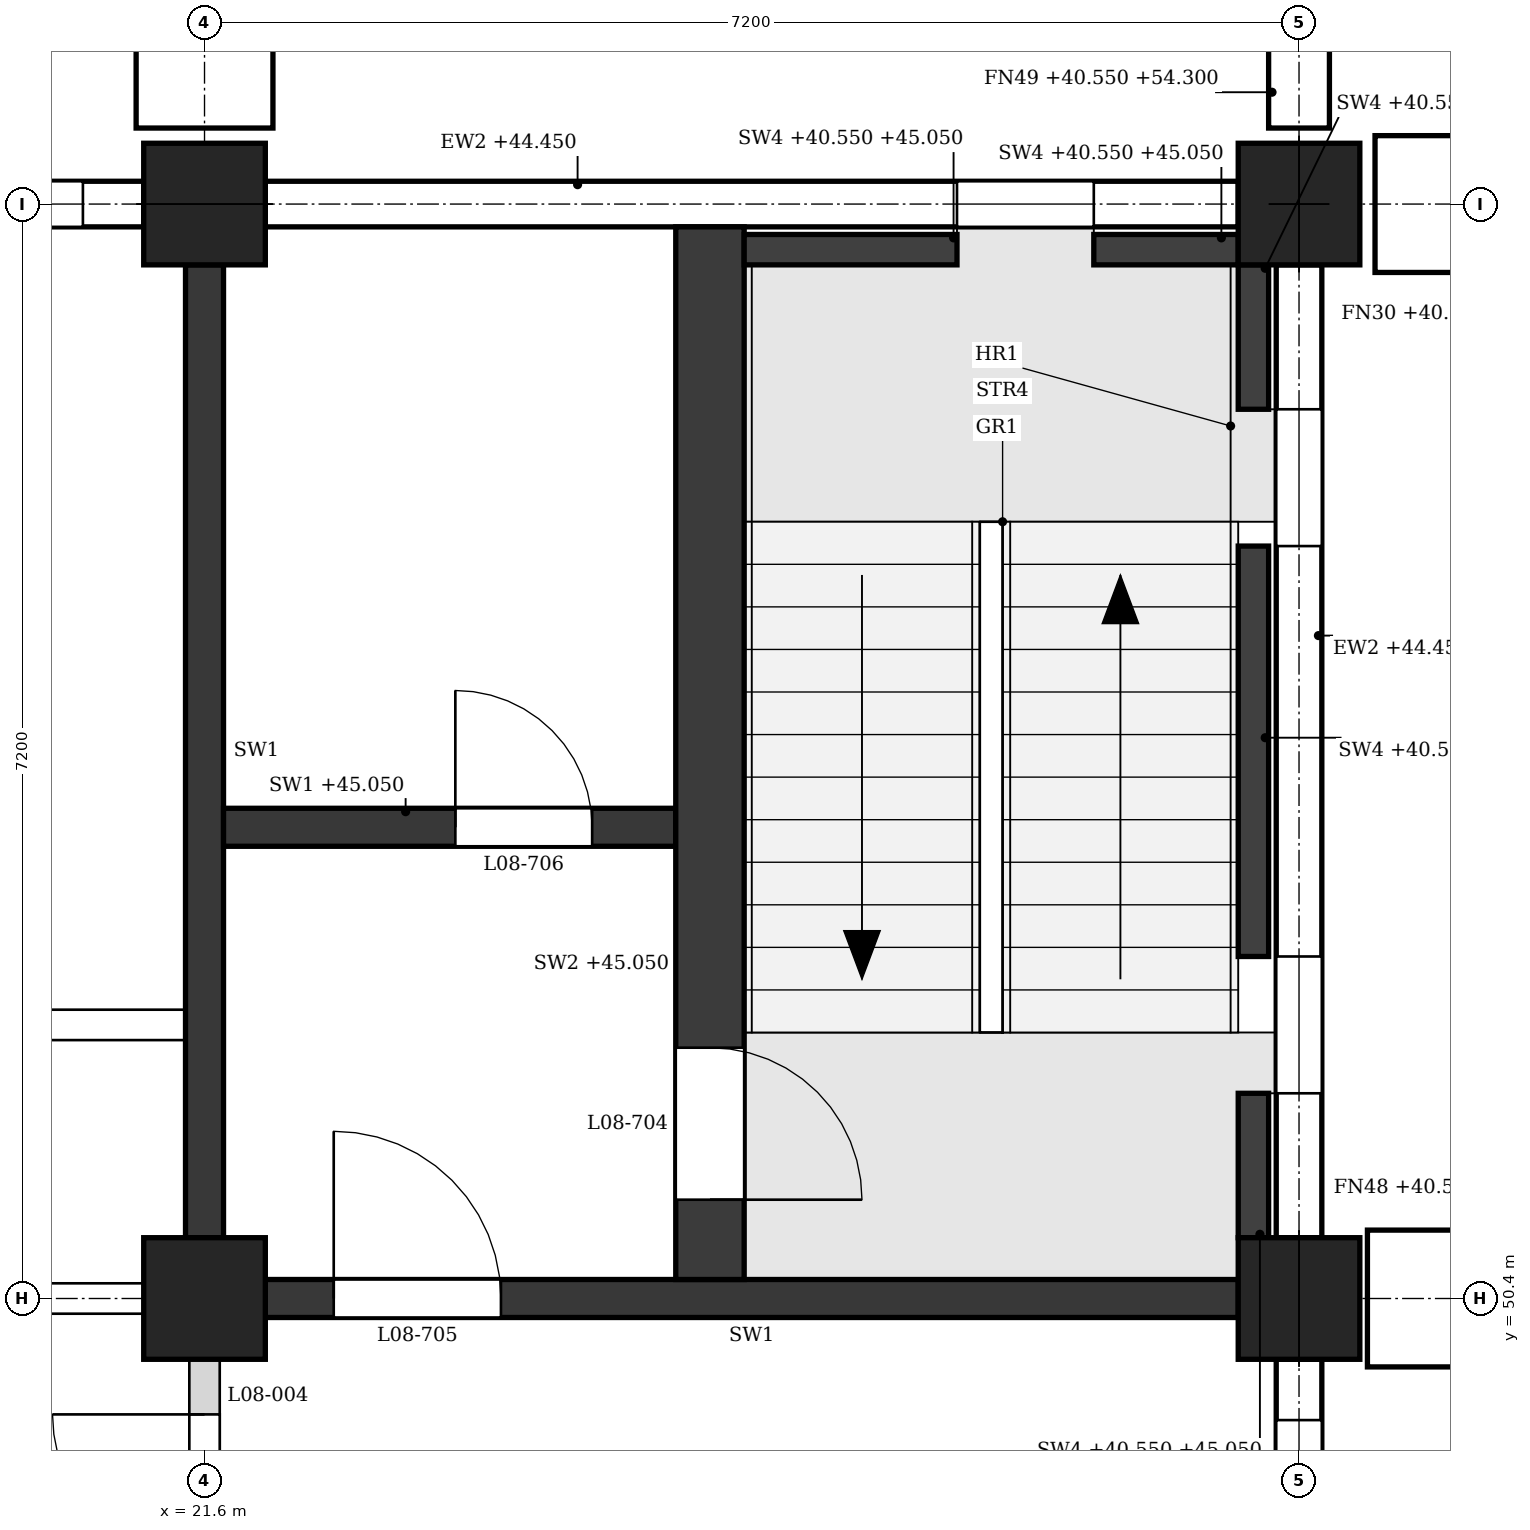
"""IFC4 building model, lengths in metres.
Left out: names, types, materials, properties, quantities, classifications, styles, units other than length and angle.
Written with IfcOpenShell. Run it as: python <this file> out.ifc"""

import sys

from ifc_helpers import new_model, si_unit, direction, frame, frame_2d, origin, origin_2d, place, context, subcontext, project, spatial, polyline, rectangle, outline, extrude, element, fill, save


model = new_model("IFC4")
c1 = context("Model", 3, precision=1e-05, world=origin(), true_north=direction((0.0, 1.0)))
c2 = subcontext(c1, "Body", "Model", "MODEL_VIEW")
j1 = project(units=[si_unit("LENGTHUNIT", "METRE"), si_unit("PLANEANGLEUNIT", "RADIAN")], contexts=[c1])
p1 = place(None, origin())
s1 = spatial("IfcSite", under=j1, at=p1, CompositionType="ELEMENT")
p2 = place(p1, origin())
s2 = spatial("IfcBuilding", under=s1, at=p2, CompositionType="ELEMENT")
p3 = place(p2, frame((0.0, 0.0, 40.8)))
s3 = spatial("IfcBuildingStorey", under=s2, at=p3, CompositionType="ELEMENT", Elevation=40.8)
for number, where, z_axis, x_axis in (
    (1, (21.6, 50.4, 0.0), (0.0, 0.0, 1.0), (1.0, 0.0, 0.0)),
    (2, (21.6, 57.6, 0.0), (0.0, 0.0, 1.0), (1.0, 0.0, 0.0)),
    (3, (28.8, 50.4, 0.0), (0.0, 0.0, 1.0), (1.0, 0.0, 0.0)),
    (4, (28.8, 57.6, 0.0), (0.0, 0.0, 1.0), (1.0, 0.0, 0.0)),
):
    element("IfcColumn", number, at=place(p3, frame(where, z_axis=z_axis, x_axis=x_axis)), inside=s3, PredefinedType="COLUMN", context=c2, shape_type="SweptSolid", body=[
        extrude(rectangle(XDim=0.8, YDim=0.8, at=origin_2d()), origin(), (0.0, 0.0, 1.0), 4.5),
    ])
p4 = place(p3, frame((28.4, 57.6, 0.0), z_axis=(0.0, 0.0, 1.0), x_axis=(-1.0, 0.0, 0.0)))
e5 = element("IfcWall", 5, at=p4, inside=s3, PredefinedType="STANDARD", context=c2, shape_type="SweptSolid", body=[
    extrude(rectangle(XDim=6.4, YDim=0.3, at=frame_2d((3.2, 0.0))), origin(), (0.0, 0.0, 1.0), 3.65),
])
p5 = place(p4, frame((0.95, 0.0, 0.9)))
e6 = element("IfcOpeningElement", 6, at=p5, cuts=e5, PredefinedType="OPENING", context=c2, shape_type="SweptSolid", body=[
    extrude(outline(polyline([(0.0, 0.0), (0.9, 0.0), (0.9, 2.25), (0.45, 2.7), (0.0, 2.25), (0.0, 0.0)])), frame((0.0, 0.16, 0.0), z_axis=(0.0, -1.0, 0.0), x_axis=(1.0, 0.0, 0.0)), (0.0, 0.0, 1.0), 0.32),
])
p6 = place(p3, frame((21.2, 57.6, 0.0), z_axis=(0.0, 0.0, 1.0), x_axis=(-1.0, 0.0, 0.0)))
e7 = element("IfcWall", 7, at=p6, inside=s3, PredefinedType="STANDARD", context=c2, shape_type="SweptSolid", body=[
    extrude(rectangle(XDim=6.4, YDim=0.3, at=frame_2d((3.2, 0.0))), origin(), (0.0, 0.0, 1.0), 3.65),
])
p7 = place(p6, frame((0.4, 0.0, 0.9)))
e8 = element("IfcOpeningElement", 8, at=p7, cuts=e7, PredefinedType="OPENING", context=c2, shape_type="SweptSolid", body=[
    extrude(outline(polyline([(0.0, 0.0), (0.85, 0.0), (0.85, 2.25), (0.425, 2.7), (0.0, 2.25), (0.0, 0.0)])), frame((0.0, 0.16, 0.0), z_axis=(0.0, -1.0, 0.0), x_axis=(1.0, 0.0, 0.0)), (0.0, 0.0, 1.0), 0.32),
])
p8 = place(p6, frame((1.55, 0.0, 0.9)))
e9 = element("IfcOpeningElement", 9, at=p8, cuts=e7, PredefinedType="OPENING", context=c2, shape_type="SweptSolid", body=[
    extrude(outline(polyline([(0.0, 0.0), (0.85, 0.0), (0.85, 2.25), (0.425, 2.7), (0.0, 2.25), (0.0, 0.0)])), frame((0.0, 0.16, 0.0), z_axis=(0.0, -1.0, 0.0), x_axis=(1.0, 0.0, 0.0)), (0.0, 0.0, 1.0), 0.32),
])
p9 = place(p6, frame((4.0, 0.0, 0.9)))
e10 = element("IfcOpeningElement", 10, at=p9, cuts=e7, PredefinedType="OPENING", context=c2, shape_type="SweptSolid", body=[
    extrude(outline(polyline([(0.0, 0.0), (0.85, 0.0), (0.85, 2.25), (0.425, 2.7), (0.0, 2.25), (0.0, 0.0)])), frame((0.0, 0.16, 0.0), z_axis=(0.0, -1.0, 0.0), x_axis=(1.0, 0.0, 0.0)), (0.0, 0.0, 1.0), 0.32),
])
p10 = place(p6, frame((5.15, 0.0, 0.9)))
e11 = element("IfcOpeningElement", 11, at=p10, cuts=e7, PredefinedType="OPENING", context=c2, shape_type="SweptSolid", body=[
    extrude(outline(polyline([(0.0, 0.0), (0.85, 0.0), (0.85, 2.25), (0.425, 2.7), (0.0, 2.25), (0.0, 0.0)])), frame((0.0, 0.16, 0.0), z_axis=(0.0, -1.0, 0.0), x_axis=(1.0, 0.0, 0.0)), (0.0, 0.0, 1.0), 0.32),
])
p11 = place(p3, frame((28.8, 43.6, 0.0), z_axis=(0.0, 0.0, 1.0), x_axis=(0.0, 1.0, 0.0)))
e12 = element("IfcWall", 12, at=p11, inside=s3, PredefinedType="STANDARD", context=c2, shape_type="SweptSolid", body=[
    extrude(rectangle(XDim=6.4, YDim=0.3, at=frame_2d((3.2, 0.0))), origin(), (0.0, 0.0, 1.0), 3.65),
])
p12 = place(p11, frame((4.0, 0.0, 0.9)))
e13 = element("IfcOpeningElement", 13, at=p12, cuts=e12, PredefinedType="OPENING", context=c2, shape_type="SweptSolid", body=[
    extrude(outline(polyline([(0.0, 0.0), (0.85, 0.0), (0.85, 2.25), (0.425, 2.7), (0.0, 2.25), (0.0, 0.0)])), frame((0.0, 0.16, 0.0), z_axis=(0.0, -1.0, 0.0), x_axis=(1.0, 0.0, 0.0)), (0.0, 0.0, 1.0), 0.32),
])
p13 = place(p11, frame((5.15, 0.0, 0.9)))
e14 = element("IfcOpeningElement", 14, at=p13, cuts=e12, PredefinedType="OPENING", context=c2, shape_type="SweptSolid", body=[
    extrude(outline(polyline([(0.0, 0.0), (0.85, 0.0), (0.85, 2.25), (0.425, 2.7), (0.0, 2.25), (0.0, 0.0)])), frame((0.0, 0.16, 0.0), z_axis=(0.0, -1.0, 0.0), x_axis=(1.0, 0.0, 0.0)), (0.0, 0.0, 1.0), 0.32),
])
p14 = place(p3, frame((28.8, 50.8, 0.0), z_axis=(0.0, 0.0, 1.0), x_axis=(0.0, 1.0, 0.0)))
e15 = element("IfcWall", 15, at=p14, inside=s3, PredefinedType="STANDARD", context=c2, shape_type="SweptSolid", body=[
    extrude(rectangle(XDim=6.4, YDim=0.3, at=frame_2d((3.2, 0.0))), origin(), (0.0, 0.0, 1.0), 3.65),
])
p15 = place(p14, frame((0.95, 0.0, 0.9)))
e16 = element("IfcOpeningElement", 16, at=p15, cuts=e15, PredefinedType="OPENING", context=c2, shape_type="SweptSolid", body=[
    extrude(outline(polyline([(0.0, 0.0), (0.9, 0.0), (0.9, 2.25), (0.45, 2.7), (0.0, 2.25), (0.0, 0.0)])), frame((0.0, 0.16, 0.0), z_axis=(0.0, -1.0, 0.0), x_axis=(1.0, 0.0, 0.0)), (0.0, 0.0, 1.0), 0.32),
])
p16 = place(p14, frame((4.55, 0.0, 0.9)))
e17 = element("IfcOpeningElement", 17, at=p16, cuts=e15, PredefinedType="OPENING", context=c2, shape_type="SweptSolid", body=[
    extrude(outline(polyline([(0.0, 0.0), (0.9, 0.0), (0.9, 2.25), (0.45, 2.7), (0.0, 2.25), (0.0, 0.0)])), frame((0.0, 0.16, 0.0), z_axis=(0.0, -1.0, 0.0), x_axis=(1.0, 0.0, 0.0)), (0.0, 0.0, 1.0), 0.32),
])
for number, where, z_axis, x_axis in (
    (18, (21.6, 58.1, -0.25), (0.0, 0.0, 1.0), (0.0, 1.0, 0.0)),
    (19, (29.25, 50.4, -0.25), (0.0, 0.0, 1.0), (1.0, 0.0, 0.0)),
):
    element("IfcWall", number, at=place(p3, frame(where, z_axis=z_axis, x_axis=x_axis)), inside=s3, PredefinedType="POLYGONAL", context=c2, shape_type="SweptSolid", body=[
        extrude(outline(polyline([(1.1, 0.0), (1.1, 12.325), (0.15, 13.75), (0.0, 13.75), (0.0, 0.0), (1.1, 0.0)])), frame((0.0, 0.45, 0.0), z_axis=(0.0, -1.0, 0.0), x_axis=(1.0, 0.0, 0.0)), (0.0, 0.0, 1.0), 0.9),
    ])
p17 = place(p3, frame((28.8, 58.1, -0.25), z_axis=(0.0, 0.0, 1.0), x_axis=(0.0, 1.0, 0.0)))
e20 = element("IfcWall", 20, at=p17, inside=s3, PredefinedType="POLYGONAL", context=c2, shape_type="SweptSolid", body=[
    extrude(outline(polyline([(0.65, 0.0), (0.65, 13.0), (0.15, 13.75), (0.0, 13.75), (0.0, 0.0), (0.65, 0.0)])), frame((0.0, 0.2, 0.0), z_axis=(0.0, -1.0, 0.0), x_axis=(1.0, 0.0, 0.0)), (0.0, 0.0, 1.0), 0.4),
])
p18 = place(p3, frame((29.3, 57.6, -0.25), z_axis=(0.0, 0.0, 1.0), x_axis=(1.0, 0.0, 0.0)))
e21 = element("IfcWall", 21, at=p18, inside=s3, PredefinedType="POLYGONAL", context=c2, shape_type="SweptSolid", body=[
    extrude(outline(polyline([(1.1, 0.0), (1.1, 12.325), (0.15, 13.75), (0.0, 13.75), (0.0, 0.0), (1.1, 0.0)])), frame((0.0, 0.45, 0.0), z_axis=(0.0, -1.0, 0.0), x_axis=(1.0, 0.0, 0.0)), (0.0, 0.0, 1.0), 0.9),
])
p19 = place(p3, frame((22.0, 50.4, 0.0), z_axis=(0.0, 0.0, 1.0), x_axis=(1.0, 0.0, 0.0)))
e22 = element("IfcWall", 22, at=p19, inside=s3, PredefinedType="SHEAR", context=c2, shape_type="SweptSolid", body=[
    extrude(rectangle(XDim=6.4, YDim=0.25, at=frame_2d((3.2, 0.0))), origin(), (0.0, 0.0, 1.0), 3.55),
])
p20 = place(p19, frame((0.45, 0.0, 0.0)))
e23 = element("IfcOpeningElement", 23, at=p20, cuts=e22, PredefinedType="OPENING", context=c2, shape_type="SweptSolid", body=[
    extrude(rectangle(XDim=1.1, YDim=2.1, at=frame_2d((0.55, 1.05))), frame((0.0, 0.135, 0.0), z_axis=(0.0, -1.0, 0.0), x_axis=(1.0, 0.0, 0.0)), (0.0, 0.0, 1.0), 0.27),
])
p21 = place(p3, frame((21.6, 50.8, 0.0), z_axis=(0.0, 0.0, 1.0), x_axis=(0.0, 1.0, 0.0)))
e24 = element("IfcWall", 24, at=p21, inside=s3, PredefinedType="SHEAR", context=c2, shape_type="SweptSolid", body=[
    extrude(rectangle(XDim=6.4, YDim=0.25, at=frame_2d((3.2, 0.0))), origin(), (0.0, 0.0, 1.0), 3.55),
])
p22 = place(p3, frame((28.5, 50.8, -0.25), z_axis=(0.0, 0.0, 1.0), x_axis=(0.0, 1.0, 0.0)))
e25 = element("IfcWall", 25, at=p22, inside=s3, PredefinedType="SHEAR", context=c2, shape_type="SweptSolid", body=[
    extrude(rectangle(XDim=0.95, YDim=0.2, at=frame_2d((0.475, 0.0))), origin(), (0.0, 0.0, 1.0), 4.5),
])
p23 = place(p3, frame((28.5, 52.65, -0.25), z_axis=(0.0, 0.0, 1.0), x_axis=(0.0, 1.0, 0.0)))
e26 = element("IfcWall", 26, at=p23, inside=s3, PredefinedType="SHEAR", context=c2, shape_type="SweptSolid", body=[
    extrude(rectangle(XDim=2.7, YDim=0.2, at=frame_2d((1.35, 0.0))), origin(), (0.0, 0.0, 1.0), 4.5),
])
p24 = place(p3, frame((28.5, 56.25, -0.25), z_axis=(0.0, 0.0, 1.0), x_axis=(0.0, 1.0, 0.0)))
e27 = element("IfcWall", 27, at=p24, inside=s3, PredefinedType="SHEAR", context=c2, shape_type="SweptSolid", body=[
    extrude(rectangle(XDim=0.95, YDim=0.2, at=frame_2d((0.475, 0.0))), origin(), (0.0, 0.0, 1.0), 4.5),
])
p25 = place(p3, frame((25.15, 57.3, -0.25), z_axis=(0.0, 0.0, 1.0), x_axis=(1.0, 0.0, 0.0)))
e28 = element("IfcWall", 28, at=p25, inside=s3, PredefinedType="SHEAR", context=c2, shape_type="SweptSolid", body=[
    extrude(rectangle(XDim=1.4, YDim=0.2, at=frame_2d((0.7, 0.0))), origin(), (0.0, 0.0, 1.0), 4.5),
])
p26 = place(p3, frame((27.45, 57.3, -0.25), z_axis=(0.0, 0.0, 1.0), x_axis=(1.0, 0.0, 0.0)))
e29 = element("IfcWall", 29, at=p26, inside=s3, PredefinedType="SHEAR", context=c2, shape_type="SweptSolid", body=[
    extrude(rectangle(XDim=0.95, YDim=0.2, at=frame_2d((0.475, 0.0))), origin(), (0.0, 0.0, 1.0), 4.5),
])
p27 = place(p3, frame((24.925, 50.525, 0.0), z_axis=(0.0, 0.0, 1.0), x_axis=(0.0, 1.0, 0.0)))
e30 = element("IfcWall", 30, at=p27, inside=s3, PredefinedType="SHEAR", context=c2, shape_type="SweptSolid", body=[
    extrude(rectangle(XDim=6.925, YDim=0.45, at=frame_2d((3.462, 0.0))), origin(), (0.0, 0.0, 1.0), 4.25),
])
p28 = place(p27, frame((0.525, 0.0, 0.0)))
e31 = element("IfcOpeningElement", 31, at=p28, cuts=e30, PredefinedType="OPENING", context=c2, shape_type="SweptSolid", body=[
    extrude(rectangle(XDim=1.0, YDim=2.1, at=frame_2d((0.5, 1.05))), frame((0.0, 0.235, 0.0), z_axis=(0.0, -1.0, 0.0), x_axis=(1.0, 0.0, 0.0)), (0.0, 0.0, 1.0), 0.47),
])
p29 = place(p3, frame((21.725, 53.5, 0.0), z_axis=(0.0, 0.0, 1.0), x_axis=(1.0, 0.0, 0.0)))
e32 = element("IfcWall", 32, at=p29, inside=s3, PredefinedType="SHEAR", context=c2, shape_type="SweptSolid", body=[
    extrude(rectangle(XDim=2.975, YDim=0.25, at=frame_2d((1.487, 0.0))), origin(), (0.0, 0.0, 1.0), 4.25),
])
p30 = place(p29, frame((1.525, 0.0, 0.0)))
e33 = element("IfcOpeningElement", 33, at=p30, cuts=e32, PredefinedType="OPENING", context=c2, shape_type="SweptSolid", body=[
    extrude(rectangle(XDim=0.9, YDim=2.1, at=frame_2d((0.45, 1.05))), frame((0.0, 0.135, 0.0), z_axis=(0.0, -1.0, 0.0), x_axis=(1.0, 0.0, 0.0)), (0.0, 0.0, 1.0), 0.27),
])
p31 = place(p3, frame((14.8, 50.4, 0.0), z_axis=(0.0, 0.0, 1.0), x_axis=(1.0, 0.0, 0.0)))
e34 = element("IfcWall", 34, at=p31, inside=s3, PredefinedType="PARTITIONING", context=c2, shape_type="SweptSolid", body=[
    extrude(rectangle(XDim=6.4, YDim=0.2, at=frame_2d((3.2, 0.0))), origin(), (0.0, 0.0, 1.0), 3.55),
])
p32 = place(p31, frame((4.3, 0.0, 0.0)))
e35 = element("IfcOpeningElement", 35, at=p32, cuts=e34, PredefinedType="OPENING", context=c2, shape_type="SweptSolid", body=[
    extrude(rectangle(XDim=1.0, YDim=2.1, at=frame_2d((0.5, 1.05))), frame((0.0, 0.11, 0.0), z_axis=(0.0, -1.0, 0.0), x_axis=(1.0, 0.0, 0.0)), (0.0, 0.0, 1.0), 0.22),
])
p33 = place(p3, frame((7.325, 52.2, 0.0), z_axis=(0.0, 0.0, 1.0), x_axis=(1.0, 0.0, 0.0)))
e36 = element("IfcWall", 36, at=p33, inside=s3, PredefinedType="PARTITIONING", context=c2, shape_type="SweptSolid", body=[
    extrude(outline(polyline([(0.0, 0.0), (14.15, 0.0), (14.15, 3.55), (14.05, 3.55), (14.05, 4.25), (7.3, 4.25), (7.3, 3.55), (6.85, 3.55), (6.85, 4.25), (0.1, 4.25), (0.1, 3.55), (0.0, 3.55), (0.0, 0.0)])), frame((0.0, 0.1, 0.0), z_axis=(0.0, -1.0, 0.0), x_axis=(1.0, 0.0, 0.0)), (0.0, 0.0, 1.0), 0.2),
])
p34 = place(p33, frame((1.238, 0.0, 0.0)))
e37 = element("IfcOpeningElement", 37, at=p34, cuts=e36, PredefinedType="OPENING", context=c2, shape_type="SweptSolid", body=[
    extrude(rectangle(XDim=1.0, YDim=2.1, at=frame_2d((0.5, 1.05))), frame((0.0, 0.11, 0.0), z_axis=(0.0, -1.0, 0.0), x_axis=(1.0, 0.0, 0.0)), (0.0, 0.0, 1.0), 0.22),
])
p35 = place(p33, frame((4.775, 0.0, 0.0)))
e38 = element("IfcOpeningElement", 38, at=p35, cuts=e36, PredefinedType="OPENING", context=c2, shape_type="SweptSolid", body=[
    extrude(rectangle(XDim=1.0, YDim=2.1, at=frame_2d((0.5, 1.05))), frame((0.0, 0.11, 0.0), z_axis=(0.0, -1.0, 0.0), x_axis=(1.0, 0.0, 0.0)), (0.0, 0.0, 1.0), 0.22),
])
p36 = place(p33, frame((8.375, 0.0, 0.0)))
e39 = element("IfcOpeningElement", 39, at=p36, cuts=e36, PredefinedType="OPENING", context=c2, shape_type="SweptSolid", body=[
    extrude(rectangle(XDim=1.0, YDim=2.1, at=frame_2d((0.5, 1.05))), frame((0.0, 0.11, 0.0), z_axis=(0.0, -1.0, 0.0), x_axis=(1.0, 0.0, 0.0)), (0.0, 0.0, 1.0), 0.22),
])
p37 = place(p33, frame((11.913, 0.0, 0.0)))
e40 = element("IfcOpeningElement", 40, at=p37, cuts=e36, PredefinedType="OPENING", context=c2, shape_type="SweptSolid", body=[
    extrude(rectangle(XDim=1.0, YDim=2.1, at=frame_2d((0.5, 1.05))), frame((0.0, 0.11, 0.0), z_axis=(0.0, -1.0, 0.0), x_axis=(1.0, 0.0, 0.0)), (0.0, 0.0, 1.0), 0.22),
])
p38 = place(p3, frame((21.6, 47.275, 0.0), z_axis=(0.0, 0.0, 1.0), x_axis=(0.0, 1.0, 0.0)))
e41 = element("IfcWall", 41, at=p38, inside=s3, PredefinedType="PARTITIONING", context=c2, shape_type="SweptSolid", body=[
    extrude(rectangle(XDim=2.725, YDim=0.2, at=frame_2d((1.363, 0.0))), origin(), (0.0, 0.0, 1.0), 3.55),
])
p39 = place(p38, frame((0.363, 0.0, 0.0)))
e42 = element("IfcOpeningElement", 42, at=p39, cuts=e41, PredefinedType="OPENING", context=c2, shape_type="SweptSolid", body=[
    extrude(rectangle(XDim=2.0, YDim=2.4, at=frame_2d((1.0, 1.2))), frame((0.0, 0.11, 0.0), z_axis=(0.0, -1.0, 0.0), x_axis=(1.0, 0.0, 0.0)), (0.0, 0.0, 1.0), 0.22),
])
p40 = place(p13, origin())
e43 = element("IfcWindow", 43, at=p40, inside=s3, PartitioningType="SINGLE_PANEL", PredefinedType="WINDOW", context=c2, shape_type="SweptSolid", body=[
    extrude(outline(polyline([(0.0, 0.0), (0.85, 0.0), (0.85, 2.25), (0.425, 2.7), (0.0, 2.25), (0.0, 0.0)])), frame((0.0, 0.03, 0.0), z_axis=(0.0, -1.0, 0.0), x_axis=(1.0, 0.0, 0.0)), (0.0, 0.0, 1.0), 0.06),
])
fill(e14, e43)
p41 = place(p15, origin())
e44 = element("IfcWindow", 44, at=p41, inside=s3, PartitioningType="SINGLE_PANEL", PredefinedType="WINDOW", context=c2, shape_type="SweptSolid", body=[
    extrude(outline(polyline([(0.0, 0.0), (0.9, 0.0), (0.9, 2.25), (0.45, 2.7), (0.0, 2.25), (0.0, 0.0)])), frame((0.0, 0.03, 0.0), z_axis=(0.0, -1.0, 0.0), x_axis=(1.0, 0.0, 0.0)), (0.0, 0.0, 1.0), 0.06),
])
fill(e16, e44)
p42 = place(p16, origin())
e45 = element("IfcWindow", 45, at=p42, inside=s3, PartitioningType="SINGLE_PANEL", PredefinedType="WINDOW", context=c2, shape_type="SweptSolid", body=[
    extrude(outline(polyline([(0.0, 0.0), (0.9, 0.0), (0.9, 2.25), (0.45, 2.7), (0.0, 2.25), (0.0, 0.0)])), frame((0.0, 0.03, 0.0), z_axis=(0.0, -1.0, 0.0), x_axis=(1.0, 0.0, 0.0)), (0.0, 0.0, 1.0), 0.06),
])
fill(e17, e45)
p43 = place(p5, origin())
e46 = element("IfcWindow", 46, at=p43, inside=s3, PartitioningType="SINGLE_PANEL", PredefinedType="WINDOW", context=c2, shape_type="SweptSolid", body=[
    extrude(outline(polyline([(0.0, 0.0), (0.9, 0.0), (0.9, 2.25), (0.45, 2.7), (0.0, 2.25), (0.0, 0.0)])), frame((0.0, 0.03, 0.0), z_axis=(0.0, -1.0, 0.0), x_axis=(1.0, 0.0, 0.0)), (0.0, 0.0, 1.0), 0.06),
])
fill(e6, e46)
p44 = place(p7, origin())
e47 = element("IfcWindow", 47, at=p44, inside=s3, PartitioningType="SINGLE_PANEL", PredefinedType="WINDOW", context=c2, shape_type="SweptSolid", body=[
    extrude(outline(polyline([(0.0, 0.0), (0.85, 0.0), (0.85, 2.25), (0.425, 2.7), (0.0, 2.25), (0.0, 0.0)])), frame((0.0, 0.03, 0.0), z_axis=(0.0, -1.0, 0.0), x_axis=(1.0, 0.0, 0.0)), (0.0, 0.0, 1.0), 0.06),
])
fill(e8, e47)
p45 = place(p28, frame((1.0, 0.0, 0.0), z_axis=(0.0, 0.0, 1.0), x_axis=(-1.0, 0.0, 0.0)))
e48 = element("IfcDoor", 48, at=p45, inside=s3, OperationType="SINGLE_SWING_RIGHT", PredefinedType="DOOR", context=c2, shape_type="SweptSolid", body=[
    extrude(rectangle(XDim=1.0, YDim=2.1, at=frame_2d((0.5, 1.05))), frame((0.0, 0.025, 0.0), z_axis=(0.0, -1.0, 0.0), x_axis=(1.0, 0.0, 0.0)), (0.0, 0.0, 1.0), 0.05),
])
fill(e31, e48)
p46 = place(p20, origin())
e49 = element("IfcDoor", 49, at=p46, inside=s3, OperationType="SINGLE_SWING_LEFT", PredefinedType="DOOR", context=c2, shape_type="SweptSolid", body=[
    extrude(rectangle(XDim=1.1, YDim=2.1, at=frame_2d((0.55, 1.05))), frame((0.0, 0.025, 0.0), z_axis=(0.0, -1.0, 0.0), x_axis=(1.0, 0.0, 0.0)), (0.0, 0.0, 1.0), 0.05),
])
fill(e23, e49)
p47 = place(p30, origin())
e50 = element("IfcDoor", 50, at=p47, inside=s3, OperationType="SINGLE_SWING_LEFT", PredefinedType="DOOR", context=c2, shape_type="SweptSolid", body=[
    extrude(rectangle(XDim=0.9, YDim=2.1, at=frame_2d((0.45, 1.05))), frame((0.0, 0.025, 0.0), z_axis=(0.0, -1.0, 0.0), x_axis=(1.0, 0.0, 0.0)), (0.0, 0.0, 1.0), 0.05),
])
fill(e33, e50)
p48 = place(p39, origin())
e51 = element("IfcDoor", 51, at=p48, inside=s3, OperationType="DOUBLE_DOOR_SINGLE_SWING", PredefinedType="DOOR", context=c2, shape_type="SweptSolid", body=[
    extrude(rectangle(XDim=2.0, YDim=2.4, at=frame_2d((1.0, 1.2))), frame((0.0, 0.025, 0.0), z_axis=(0.0, -1.0, 0.0), x_axis=(1.0, 0.0, 0.0)), (0.0, 0.0, 1.0), 0.05),
])
fill(e42, e51)
save(model, sys.argv[1])
